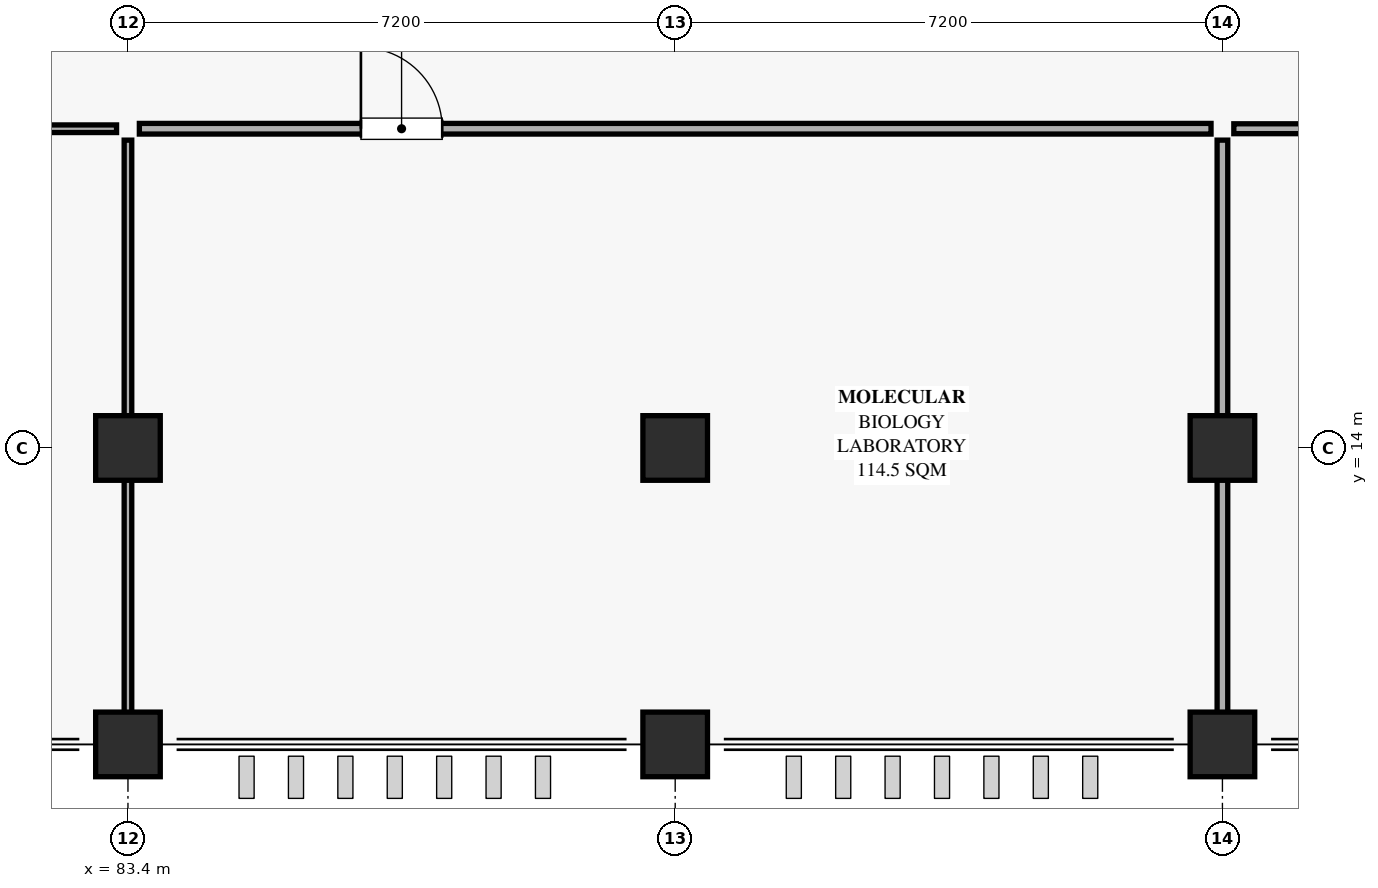
"""IFC4 building model, lengths in metres.
Left out: names, types, materials, properties, quantities, classifications, styles, units other than length and angle.
Written with IfcOpenShell. Run it as: python <this file> out.ifc"""

import sys

from ifc_helpers import new_model, si_unit, direction, frame, frame_2d, origin, origin_2d, place, context, subcontext, project, spatial, rectangle, extrude, element, fill, save


model = new_model("IFC4")
c1 = context("Model", 3, precision=1e-05, world=origin(), true_north=direction((0.0, 1.0)))
c2 = subcontext(c1, "Body", "Model", "MODEL_VIEW")
j1 = project(units=[si_unit("LENGTHUNIT", "METRE"), si_unit("PLANEANGLEUNIT", "RADIAN")], contexts=[c1])
p1 = place(None, origin())
s1 = spatial("IfcSite", under=j1, at=p1, CompositionType="ELEMENT")
p2 = place(p1, origin())
s2 = spatial("IfcBuilding", under=s1, at=p2, CompositionType="ELEMENT")
p3 = place(p2, frame((0.0, 0.0, 19.8)))
s3 = spatial("IfcBuildingStorey", under=s2, at=p3, CompositionType="ELEMENT", Elevation=19.8)
for number, where, z_axis, x_axis in (
    (1, (83.4, 10.1, 0.0), (0.0, 0.0, 1.0), (1.0, 0.0, 0.0)),
    (2, (90.6, 10.1, 0.0), (0.0, 0.0, 1.0), (1.0, 0.0, 0.0)),
    (3, (97.8, 10.1, 0.0), (0.0, 0.0, 1.0), (1.0, 0.0, 0.0)),
    (4, (83.4, 14.0, 0.0), (0.0, 0.0, 1.0), (1.0, 0.0, 0.0)),
    (5, (90.6, 14.0, 0.0), (0.0, 0.0, 1.0), (1.0, 0.0, 0.0)),
    (6, (97.8, 14.0, 0.0), (0.0, 0.0, 1.0), (1.0, 0.0, 0.0)),
):
    element("IfcColumn", number, at=place(p3, frame(where, z_axis=z_axis, x_axis=x_axis)), inside=s3, PredefinedType="COLUMN", context=c2, shape_type="SweptSolid", body=[
        extrude(rectangle(XDim=0.85, YDim=0.85, at=origin_2d()), origin(), (0.0, 0.0, 1.0), 4.5),
    ])
p4 = place(p3, frame((54.95, 18.2, 0.0), z_axis=(0.0, 0.0, 1.0), x_axis=(1.0, 0.0, 0.0)))
e7 = element("IfcWall", 7, at=p4, inside=s3, PredefinedType="PARTITIONING", context=c2, shape_type="SweptSolid", body=[
    extrude(rectangle(XDim=28.3, YDim=0.1, at=frame_2d((14.15, 0.0))), origin(), (0.0, 0.0, 1.0), 2.98),
])
p5 = place(p4, frame((2.735, 0.0, 0.0)))
e8 = element("IfcOpeningElement", 8, at=p5, cuts=e7, PredefinedType="OPENING", context=c2, shape_type="SweptSolid", body=[
    extrude(rectangle(XDim=1.03, YDim=2.22, at=frame_2d((0.515, 1.11))), frame((0.0, 0.06, 0.0), z_axis=(0.0, -1.0, 0.0), x_axis=(1.0, 0.0, 0.0)), (0.0, 0.0, 1.0), 0.12),
])
p6 = place(p3, frame((83.4, 18.05, 0.0), z_axis=(0.0, 0.0, 1.0), x_axis=(0.0, -1.0, 0.0)))
e9 = element("IfcWall", 9, at=p6, inside=s3, PredefinedType="PARTITIONING", context=c2, shape_type="SweptSolid", body=[
    extrude(rectangle(XDim=7.65, YDim=0.1, at=frame_2d((3.825, 0.0))), origin(), (0.0, 0.0, 1.0), 2.98),
])
p7 = place(p3, frame((83.55, 18.2, 0.0), z_axis=(0.0, 0.0, 1.0), x_axis=(1.0, 0.0, 0.0)))
e10 = element("IfcWall", 10, at=p7, inside=s3, PredefinedType="PARTITIONING", context=c2, shape_type="SweptSolid", body=[
    extrude(rectangle(XDim=14.1, YDim=0.14, at=frame_2d((7.05, 0.0))), origin(), (0.0, 0.0, 1.0), 2.98),
])
p8 = place(p7, frame((2.915, 0.0, 0.0)))
e11 = element("IfcOpeningElement", 11, at=p8, cuts=e10, PredefinedType="OPENING", context=c2, shape_type="SweptSolid", body=[
    extrude(rectangle(XDim=1.07, YDim=2.05, at=frame_2d((0.535, 1.025))), frame((0.0, 0.08, 0.0), z_axis=(0.0, -1.0, 0.0), x_axis=(1.0, 0.0, 0.0)), (0.0, 0.0, 1.0), 0.16),
])
p9 = place(p3, frame((97.8, 18.05, 0.0), z_axis=(0.0, 0.0, 1.0), x_axis=(0.0, -1.0, 0.0)))
e12 = element("IfcWall", 12, at=p9, inside=s3, PredefinedType="PARTITIONING", context=c2, shape_type="SweptSolid", body=[
    extrude(rectangle(XDim=7.65, YDim=0.14, at=frame_2d((3.825, 0.0))), origin(), (0.0, 0.0, 1.0), 2.98),
])
p10 = place(p3, frame((97.95, 18.2, 0.0), z_axis=(0.0, 0.0, 1.0), x_axis=(1.0, 0.0, 0.0)))
e13 = element("IfcWall", 13, at=p10, inside=s3, PredefinedType="PARTITIONING", context=c2, shape_type="SweptSolid", body=[
    extrude(rectangle(XDim=21.1, YDim=0.13, at=frame_2d((10.55, 0.0))), origin(), (0.0, 0.0, 1.0), 2.98),
])
p11 = place(p10, frame((17.315, 0.0, 0.0)))
e14 = element("IfcOpeningElement", 14, at=p11, cuts=e13, PredefinedType="OPENING", context=c2, shape_type="SweptSolid", body=[
    extrude(rectangle(XDim=1.07, YDim=2.1, at=frame_2d((0.535, 1.05))), frame((0.0, 0.075, 0.0), z_axis=(0.0, -1.0, 0.0), x_axis=(1.0, 0.0, 0.0)), (0.0, 0.0, 1.0), 0.15),
])
p12 = place(p8, origin())
e15 = element("IfcDoor", 15, at=p12, inside=s3, OperationType="SINGLE_SWING_LEFT", PredefinedType="DOOR", context=c2, shape_type="SweptSolid", body=[
    extrude(rectangle(XDim=1.07, YDim=2.05, at=frame_2d((0.535, 1.025))), frame((0.0, 0.025, 0.0), z_axis=(0.0, -1.0, 0.0), x_axis=(1.0, 0.0, 0.0)), (0.0, 0.0, 1.0), 0.05),
])
fill(e11, e15)
save(model, sys.argv[1])
